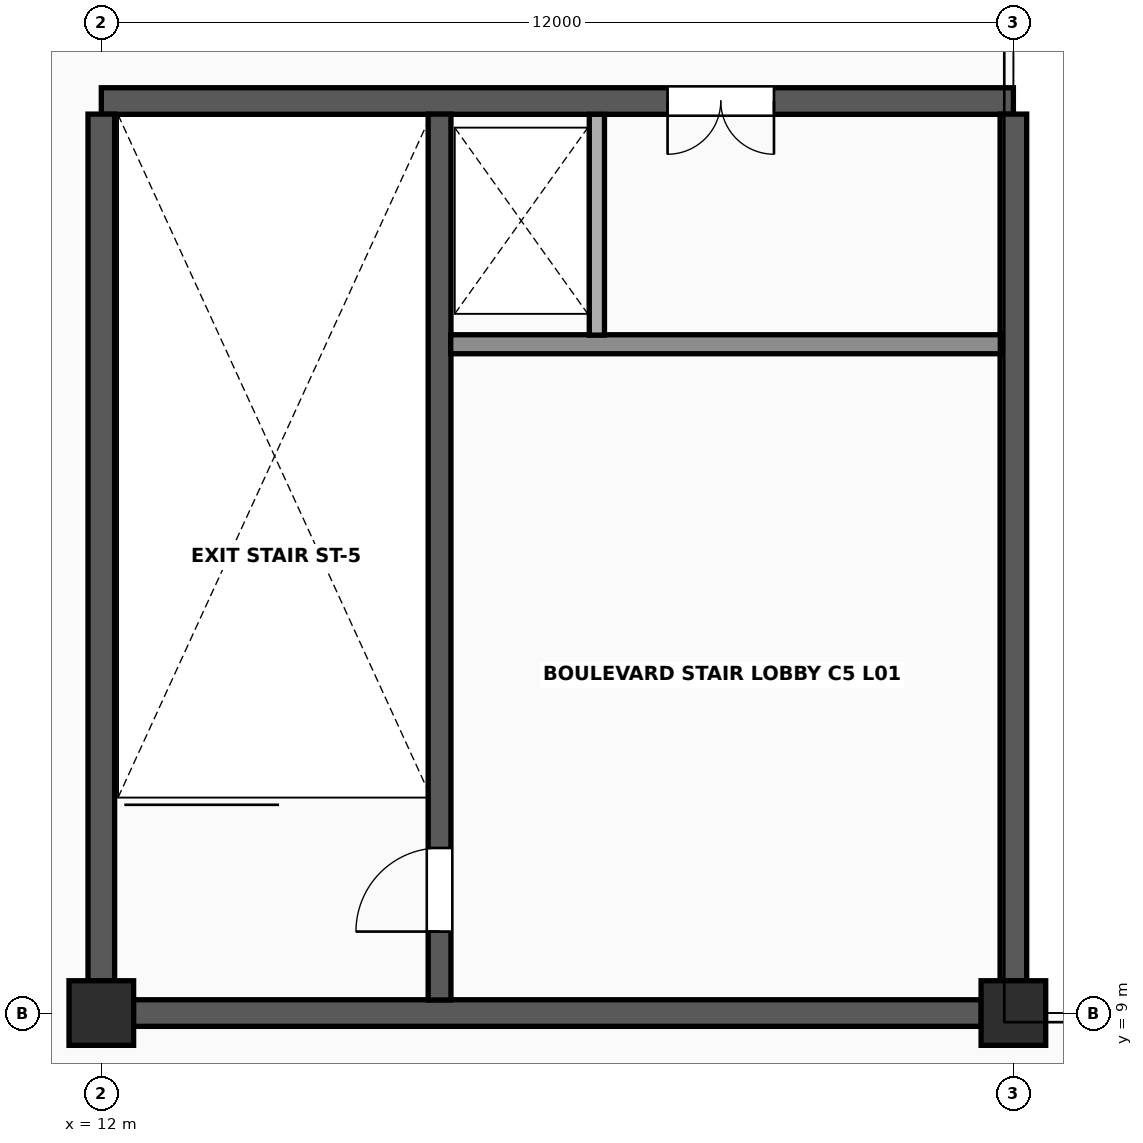
"""IFC4 building model, lengths in metres.
Left out: names, types, materials, properties, quantities, classifications, styles, units other than length and angle.
Written with IfcOpenShell. Run it as: python <this file> out.ifc"""

import sys

from ifc_helpers import new_model, si_unit, direction, frame, frame_2d, origin, origin_2d, place, context, subcontext, project, spatial, rectangle, extrude, element, fill, save


model = new_model("IFC4")
c1 = context("Model", 3, precision=1e-05, world=origin(), true_north=direction((0.0, 1.0)))
c2 = subcontext(c1, "Body", "Model", "MODEL_VIEW")
j1 = project(units=[si_unit("LENGTHUNIT", "METRE"), si_unit("PLANEANGLEUNIT", "RADIAN")], contexts=[c1])
p1 = place(None, origin())
s1 = spatial("IfcSite", under=j1, at=p1, CompositionType="ELEMENT")
p2 = place(p1, origin())
s2 = spatial("IfcBuilding", under=s1, at=p2, CompositionType="ELEMENT")
p3 = place(p2, frame((0.0, 0.0, 5.4)))
s3 = spatial("IfcBuildingStorey", under=s2, at=p3, CompositionType="ELEMENT", Elevation=5.4)
for number, where, z_axis, x_axis in (
    (1, (12.0, 9.0, 0.0), (0.0, 0.0, 1.0), (1.0, 0.0, 0.0)),
    (2, (24.0, 9.0, 0.0), (0.0, 0.0, 1.0), (1.0, 0.0, 0.0)),
):
    element("IfcColumn", number, at=place(p3, frame(where, z_axis=z_axis, x_axis=x_axis)), inside=s3, PredefinedType="COLUMN", context=c2, shape_type="SweptSolid", body=[
        extrude(rectangle(XDim=0.85, YDim=0.85, at=origin_2d()), origin(), (0.0, 0.0, 1.0), 4.2),
    ])
p4 = place(p3, frame((12.422, 9.0, 0.0), z_axis=(0.0, 0.0, 1.0), x_axis=(1.0, 0.0, 0.0)))
e3 = element("IfcWall", 3, at=p4, inside=s3, PredefinedType="SHEAR", context=c2, shape_type="SweptSolid", body=[
    extrude(rectangle(XDim=11.156, YDim=0.35, at=frame_2d((5.578, 0.0))), origin(), (0.0, 0.0, 1.0), 4.043),
])
p5 = place(p3, frame((12.0, 21.0, 0.0), z_axis=(0.0, 0.0, 1.0), x_axis=(1.0, 0.0, 0.0)))
e4 = element("IfcWall", 4, at=p5, inside=s3, PredefinedType="SHEAR", context=c2, shape_type="SweptSolid", body=[
    extrude(rectangle(XDim=12.0, YDim=0.35, at=frame_2d((6.0, 0.0))), origin(), (0.0, 0.0, 1.0), 4.043),
])
p6 = place(p5, frame((7.45, 0.0, 0.0)))
e5 = element("IfcOpeningElement", 5, at=p6, cuts=e4, PredefinedType="OPENING", context=c2, shape_type="SweptSolid", body=[
    extrude(rectangle(XDim=1.4, YDim=2.22, at=frame_2d((0.7, 1.11))), frame((0.0, 0.19, 0.0), z_axis=(0.0, -1.0, 0.0), x_axis=(1.0, 0.0, 0.0)), (0.0, 0.0, 1.0), 0.38),
])
for number, where, z_axis, x_axis in (
    (6, (12.0, 9.422, 0.0), (0.0, 0.0, 1.0), (0.0, 1.0, 0.0)),
    (7, (24.0, 9.422, 0.0), (0.0, 0.0, 1.0), (0.0, 1.0, 0.0)),
):
    element("IfcWall", number, at=place(p3, frame(where, z_axis=z_axis, x_axis=x_axis)), inside=s3, PredefinedType="SHEAR", context=c2, shape_type="SweptSolid", body=[
        extrude(rectangle(XDim=11.406, YDim=0.35, at=frame_2d((5.703, 0.0))), origin(), (0.0, 0.0, 1.0), 4.043),
    ])
p7 = place(p3, frame((16.45, 9.172, 0.0), z_axis=(0.0, 0.0, 1.0), x_axis=(0.0, 1.0, 0.0)))
e8 = element("IfcWall", 8, at=p7, inside=s3, PredefinedType="SHEAR", context=c2, shape_type="SweptSolid", body=[
    extrude(rectangle(XDim=11.656, YDim=0.3, at=frame_2d((5.828, 0.0))), origin(), (0.0, 0.0, 1.0), 4.043),
])
p8 = place(p7, frame((0.9, 0.0, 0.0)))
e9 = element("IfcOpeningElement", 9, at=p8, cuts=e8, PredefinedType="OPENING", context=c2, shape_type="SweptSolid", body=[
    extrude(rectangle(XDim=1.1, YDim=2.2, at=frame_2d((0.55, 1.1))), frame((0.0, 0.165, 0.0), z_axis=(0.0, -1.0, 0.0), x_axis=(1.0, 0.0, 0.0)), (0.0, 0.0, 1.0), 0.33),
])
p9 = place(p3, frame((16.597, 17.8, 0.0), z_axis=(0.0, 0.0, 1.0), x_axis=(1.0, 0.0, 0.0)))
e10 = element("IfcWall", 10, at=p9, inside=s3, PredefinedType="SOLIDWALL", context=c2, shape_type="SweptSolid", body=[
    extrude(rectangle(XDim=7.231, YDim=0.25, at=frame_2d((3.615, 0.0))), origin(), (0.0, 0.0, 1.0), 4.043),
])
p10 = place(p3, frame((18.52, 17.92, 0.0), z_axis=(0.0, 0.0, 1.0), x_axis=(0.0, 1.0, 0.0)))
e11 = element("IfcWall", 11, at=p10, inside=s3, PredefinedType="SOLIDWALL", context=c2, shape_type="SweptSolid", body=[
    extrude(rectangle(XDim=2.905, YDim=0.2, at=frame_2d((1.453, 0.0))), origin(), (0.0, 0.0, 1.0), 4.033),
])
p11 = place(p8, origin())
e12 = element("IfcDoor", 12, at=p11, inside=s3, OperationType="SINGLE_SWING_LEFT", PredefinedType="DOOR", context=c2, shape_type="SweptSolid", body=[
    extrude(rectangle(XDim=1.1, YDim=2.2, at=frame_2d((0.55, 1.1))), frame((0.0, 0.025, 0.0), z_axis=(0.0, -1.0, 0.0), x_axis=(1.0, 0.0, 0.0)), (0.0, 0.0, 1.0), 0.05),
])
fill(e9, e12)
p12 = place(p6, origin())
e13 = element("IfcDoor", 13, at=p12, inside=s3, OperationType="DOUBLE_DOOR_SINGLE_SWING", PredefinedType="DOOR", context=c2, shape_type="SweptSolid", body=[
    extrude(rectangle(XDim=1.4, YDim=2.22, at=frame_2d((0.7, 1.11))), frame((0.0, 0.025, 0.0), z_axis=(0.0, -1.0, 0.0), x_axis=(1.0, 0.0, 0.0)), (0.0, 0.0, 1.0), 0.05),
])
fill(e5, e13)
save(model, sys.argv[1])
